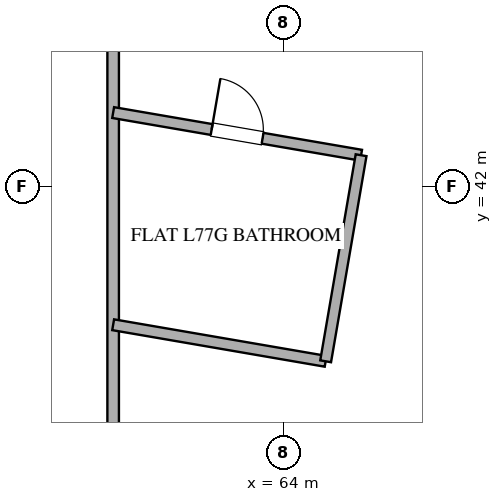
"""IFC4 building model, lengths in metres.
Left out: names, types, materials, properties, quantities, classifications, styles, units other than length and angle.
Written with IfcOpenShell. Run it as: python <this file> out.ifc"""

import sys

from ifc_helpers import new_model, si_unit, direction, frame, frame_2d, origin, place, context, subcontext, project, spatial, rectangle, extrude, element, fill, save


model = new_model("IFC4")
c1 = context("Model", 3, precision=1e-05, world=origin(), true_north=direction((0.0, 1.0)))
c2 = subcontext(c1, "Body", "Model", "MODEL_VIEW")
j1 = project(units=[si_unit("LENGTHUNIT", "METRE"), si_unit("PLANEANGLEUNIT", "RADIAN")], contexts=[c1])
p1 = place(None, origin())
s1 = spatial("IfcSite", under=j1, at=p1, CompositionType="ELEMENT")
p2 = place(p1, origin())
s2 = spatial("IfcBuilding", under=s1, at=p2, CompositionType="ELEMENT")
p3 = place(p2, frame((0.0, 0.0, 298.2)))
s3 = spatial("IfcBuildingStorey", under=s2, at=p3, CompositionType="ELEMENT", Elevation=298.2)
p4 = place(p3, frame((61.2, 45.252, 0.0), z_axis=(0.0, 0.0, 1.0), x_axis=(0.0, -1.0, 0.0)))
e1 = element("IfcWall", 1, at=p4, inside=s3, PredefinedType="PARTITIONING", context=c2, shape_type="SweptSolid", body=[
    extrude(rectangle(XDim=11.252, YDim=0.19, at=frame_2d((5.626, 0.0))), origin(), (0.0, 0.0, 1.0), 2.73),
])
p5 = place(p4, frame((7.871, 0.0, 0.0)))
e2 = element("IfcOpeningElement", 2, at=p5, cuts=e1, PredefinedType="OPENING", context=c2, shape_type="SweptSolid", body=[
    extrude(rectangle(XDim=1.0, YDim=2.2, at=frame_2d((0.5, 1.1))), frame((0.0, 0.105, 0.0), z_axis=(0.0, -1.0, 0.0), x_axis=(1.0, 0.0, 0.0)), (0.0, 0.0, 1.0), 0.21),
])
p6 = place(p3, frame((61.2, 43.219, 0.0), z_axis=(0.0, 0.0, 1.0), x_axis=(0.985525793949, -0.169525542211, 0.0)))
e3 = element("IfcWall", 3, at=p6, inside=s3, PredefinedType="PLUMBINGWALL", context=c2, shape_type="SweptSolid", body=[
    extrude(rectangle(XDim=4.137, YDim=0.18, at=frame_2d((2.069, 0.0))), origin(), (0.0, 0.0, 1.0), 2.73),
])
p7 = place(p6, frame((1.644, 0.0, 0.0)))
e4 = element("IfcOpeningElement", 4, at=p7, cuts=e3, PredefinedType="OPENING", context=c2, shape_type="SweptSolid", body=[
    extrude(rectangle(XDim=0.85, YDim=2.1, at=frame_2d((0.425, 1.05))), frame((0.0, 0.1, 0.0), z_axis=(0.0, -1.0, 0.0), x_axis=(1.0, 0.0, 0.0)), (0.0, 0.0, 1.0), 0.2),
])
p8 = place(p3, frame((64.695, 39.128, 0.0), z_axis=(0.0, 0.0, 1.0), x_axis=(-0.98552840959, 0.169510335644, 0.0)))
e5 = element("IfcWall", 5, at=p8, inside=s3, PredefinedType="PLUMBINGWALL", context=c2, shape_type="SweptSolid", body=[
    extrude(rectangle(XDim=3.546, YDim=0.18, at=frame_2d((1.773, 0.0))), origin(), (0.0, 0.0, 1.0), 2.73),
])
p9 = place(p3, frame((65.278, 42.517, 0.0), z_axis=(0.0, 0.0, 1.0), x_axis=(-0.169543142836, -0.98552276621, 0.0)))
e6 = element("IfcWall", 6, at=p9, inside=s3, PredefinedType="PLUMBINGWALL", context=c2, shape_type="SweptSolid", body=[
    extrude(rectangle(XDim=3.439, YDim=0.18, at=frame_2d((1.719, 0.0))), origin(), (0.0, 0.0, 1.0), 2.73),
])
p10 = place(p7, origin())
e7 = element("IfcDoor", 7, at=p10, inside=s3, OperationType="SINGLE_SWING_LEFT", PredefinedType="DOOR", context=c2, shape_type="SweptSolid", body=[
    extrude(rectangle(XDim=0.85, YDim=2.1, at=frame_2d((0.425, 1.05))), frame((0.0, 0.025, 0.0), z_axis=(0.0, -1.0, 0.0), x_axis=(1.0, 0.0, 0.0)), (0.0, 0.0, 1.0), 0.05),
])
fill(e4, e7)
save(model, sys.argv[1])
